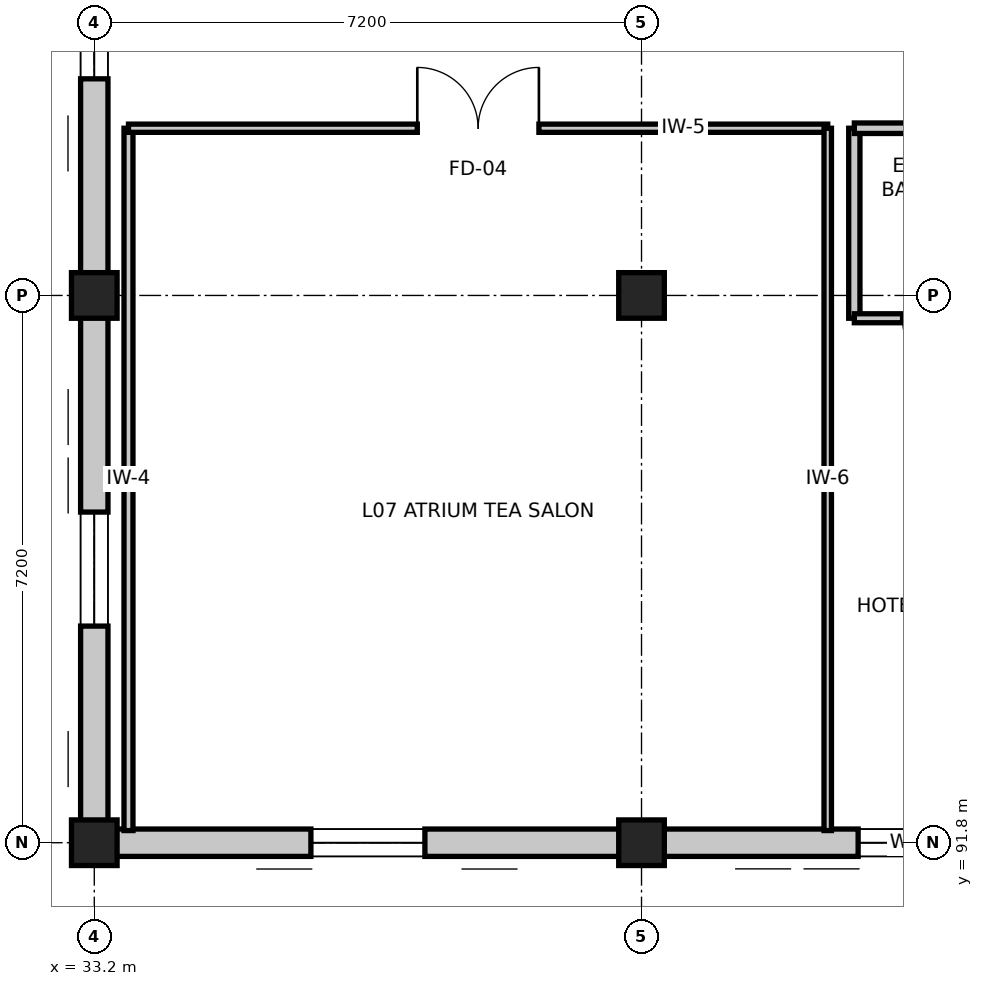
"""IFC4 building model, lengths in metres.
Left out: names, types, materials, properties, quantities, classifications, styles, units other than length and angle.
Written with IfcOpenShell. Run it as: python <this file> out.ifc"""

import sys

from ifc_helpers import new_model, si_unit, direction, frame, frame_2d, origin, origin_2d, place, context, subcontext, project, spatial, rectangle, extrude, element, fill, save


model = new_model("IFC4")
c1 = context("Model", 3, precision=1e-05, world=origin(), true_north=direction((0.0, 1.0)))
c2 = subcontext(c1, "Body", "Model", "MODEL_VIEW")
j1 = project(units=[si_unit("LENGTHUNIT", "METRE"), si_unit("PLANEANGLEUNIT", "RADIAN")], contexts=[c1])
p1 = place(None, origin())
s1 = spatial("IfcSite", under=j1, at=p1, CompositionType="ELEMENT")
p2 = place(p1, origin())
s2 = spatial("IfcBuilding", under=s1, at=p2, CompositionType="ELEMENT")
p3 = place(p2, frame((0.0, 0.0, 30.0)))
s3 = spatial("IfcBuildingStorey", under=s2, at=p3, CompositionType="ELEMENT", Elevation=30.0)
for number, where, z_axis, x_axis in (
    (1, (33.2, 91.8, 0.0), (0.0, 0.0, 1.0), (1.0, 0.0, 0.0)),
    (2, (33.2, 99.0, 0.0), (0.0, 0.0, 1.0), (1.0, 0.0, 0.0)),
    (3, (40.4, 91.8, 0.0), (0.0, 0.0, 1.0), (1.0, 0.0, 0.0)),
    (4, (40.4, 99.0, 0.0), (0.0, 0.0, 1.0), (1.0, 0.0, 0.0)),
):
    element("IfcColumn", number, at=place(p3, frame(where, z_axis=z_axis, x_axis=x_axis)), inside=s3, PredefinedType="COLUMN", context=c2, shape_type="SweptSolid", body=[
        extrude(rectangle(XDim=0.6, YDim=0.6, at=origin_2d()), origin(), (0.0, 0.0, 1.0), 3.6),
    ])
p4 = place(p3, frame((47.6, 91.8, 0.0), z_axis=(0.0, 0.0, 1.0), x_axis=(-1.0, 0.0, 0.0)))
e5 = element("IfcWall", 5, at=p4, inside=s3, PredefinedType="STANDARD", context=c2, shape_type="SweptSolid", body=[
    extrude(rectangle(XDim=7.2, YDim=0.36, at=frame_2d((3.6, 0.0))), origin(), (0.0, 0.0, 1.0), 2.745),
])
p5 = place(p4, frame((2.85, 0.0, 0.75)))
e6 = element("IfcOpeningElement", 6, at=p5, cuts=e5, PredefinedType="OPENING", context=c2, shape_type="SweptSolid", body=[
    extrude(rectangle(XDim=1.5, YDim=1.5, at=frame_2d((0.75, 0.75))), frame((0.0, 0.19, 0.0), z_axis=(0.0, -1.0, 0.0), x_axis=(1.0, 0.0, 0.0)), (0.0, 0.0, 1.0), 0.38),
])
p6 = place(p3, frame((40.4, 91.8, 0.0), z_axis=(0.0, 0.0, 1.0), x_axis=(-1.0, 0.0, 0.0)))
e7 = element("IfcWall", 7, at=p6, inside=s3, PredefinedType="STANDARD", context=c2, shape_type="SweptSolid", body=[
    extrude(rectangle(XDim=7.2, YDim=0.36, at=frame_2d((3.6, 0.0))), origin(), (0.0, 0.0, 1.0), 2.745),
])
p7 = place(p6, frame((2.85, 0.0, 0.75)))
e8 = element("IfcOpeningElement", 8, at=p7, cuts=e7, PredefinedType="OPENING", context=c2, shape_type="SweptSolid", body=[
    extrude(rectangle(XDim=1.5, YDim=1.5, at=frame_2d((0.75, 0.75))), frame((0.0, 0.19, 0.0), z_axis=(0.0, -1.0, 0.0), x_axis=(1.0, 0.0, 0.0)), (0.0, 0.0, 1.0), 0.38),
])
p8 = place(p3, frame((33.2, 91.8, 0.0), z_axis=(0.0, 0.0, 1.0), x_axis=(0.0, 1.0, 0.0)))
e9 = element("IfcWall", 9, at=p8, inside=s3, PredefinedType="STANDARD", context=c2, shape_type="SweptSolid", body=[
    extrude(rectangle(XDim=7.2, YDim=0.36, at=frame_2d((3.6, 0.0))), origin(), (0.0, 0.0, 1.0), 2.695),
])
p9 = place(p8, frame((2.85, 0.0, 0.75)))
e10 = element("IfcOpeningElement", 10, at=p9, cuts=e9, PredefinedType="OPENING", context=c2, shape_type="SweptSolid", body=[
    extrude(rectangle(XDim=1.5, YDim=1.5, at=frame_2d((0.75, 0.75))), frame((0.0, 0.19, 0.0), z_axis=(0.0, -1.0, 0.0), x_axis=(1.0, 0.0, 0.0)), (0.0, 0.0, 1.0), 0.38),
])
p10 = place(p3, frame((33.2, 99.0, 0.0), z_axis=(0.0, 0.0, 1.0), x_axis=(0.0, 1.0, 0.0)))
e11 = element("IfcWall", 11, at=p10, inside=s3, PredefinedType="STANDARD", context=c2, shape_type="SweptSolid", body=[
    extrude(rectangle(XDim=7.2, YDim=0.36, at=frame_2d((3.6, 0.0))), origin(), (0.0, 0.0, 1.0), 2.695),
])
p11 = place(p10, frame((2.85, 0.0, 0.75)))
e12 = element("IfcOpeningElement", 12, at=p11, cuts=e11, PredefinedType="OPENING", context=c2, shape_type="SweptSolid", body=[
    extrude(rectangle(XDim=1.5, YDim=1.5, at=frame_2d((0.75, 0.75))), frame((0.0, 0.19, 0.0), z_axis=(0.0, -1.0, 0.0), x_axis=(1.0, 0.0, 0.0)), (0.0, 0.0, 1.0), 0.38),
])
p12 = place(p3, frame((33.65, 91.96, 0.0), z_axis=(0.0, 0.0, 1.0), x_axis=(0.0, 1.0, 0.0)))
e13 = element("IfcWall", 13, at=p12, inside=s3, PredefinedType="PARTITIONING", context=c2, shape_type="SweptSolid", body=[
    extrude(rectangle(XDim=9.24, YDim=0.118, at=frame_2d((4.62, 0.0))), origin(), (0.0, 0.0, 1.0), 2.745),
])
p13 = place(p3, frame((33.65, 101.2, 0.0), z_axis=(0.0, 0.0, 1.0), x_axis=(1.0, 0.0, 0.0)))
e14 = element("IfcWall", 14, at=p13, inside=s3, PredefinedType="PARTITIONING", context=c2, shape_type="SweptSolid", body=[
    extrude(rectangle(XDim=9.2, YDim=0.108, at=frame_2d((4.6, 0.0))), origin(), (0.0, 0.0, 1.0), 2.695),
])
p14 = place(p13, frame((3.8, 0.0, 0.0)))
e15 = element("IfcOpeningElement", 15, at=p14, cuts=e14, PredefinedType="OPENING", context=c2, shape_type="SweptSolid", body=[
    extrude(rectangle(XDim=1.6, YDim=2.15, at=frame_2d((0.8, 1.075))), frame((0.0, 0.064, 0.0), z_axis=(0.0, -1.0, 0.0), x_axis=(1.0, 0.0, 0.0)), (0.0, 0.0, 1.0), 0.128),
])
p15 = place(p3, frame((42.85, 101.2, 0.0), z_axis=(0.0, 0.0, 1.0), x_axis=(0.0, -1.0, 0.0)))
e16 = element("IfcWall", 16, at=p15, inside=s3, PredefinedType="PARTITIONING", context=c2, shape_type="SweptSolid", body=[
    extrude(rectangle(XDim=9.24, YDim=0.098, at=frame_2d((4.62, 0.0))), origin(), (0.0, 0.0, 1.0), 2.745),
])
p16 = place(p3, frame((43.2, 98.7, 0.0), z_axis=(0.0, 0.0, 1.0), x_axis=(0.0, 1.0, 0.0)))
e17 = element("IfcWall", 17, at=p16, inside=s3, PredefinedType="PARTITIONING", context=c2, shape_type="SweptSolid", body=[
    extrude(rectangle(XDim=2.5, YDim=0.148, at=frame_2d((1.25, 0.0))), origin(), (0.0, 0.0, 1.0), 2.745),
])
p17 = place(p3, frame((43.2, 101.2, 0.0), z_axis=(0.0, 0.0, 1.0), x_axis=(1.0, 0.0, 0.0)))
e18 = element("IfcWall", 18, at=p17, inside=s3, PredefinedType="PARTITIONING", context=c2, shape_type="SweptSolid", body=[
    extrude(rectangle(XDim=2.2, YDim=0.138, at=frame_2d((1.1, 0.0))), origin(), (0.0, 0.0, 1.0), 3.36),
])
p18 = place(p3, frame((45.4, 98.7, 0.0), z_axis=(0.0, 0.0, 1.0), x_axis=(-1.0, 0.0, 0.0)))
e19 = element("IfcWall", 19, at=p18, inside=s3, PredefinedType="PARTITIONING", context=c2, shape_type="SweptSolid", body=[
    extrude(rectangle(XDim=2.2, YDim=0.118, at=frame_2d((1.1, 0.0))), origin(), (0.0, 0.0, 1.0), 3.36),
])
p19 = place(p18, frame((0.635, 0.0, 0.0)))
e20 = element("IfcOpeningElement", 20, at=p19, cuts=e19, PredefinedType="OPENING", context=c2, shape_type="SweptSolid", body=[
    extrude(rectangle(XDim=0.93, YDim=2.13, at=frame_2d((0.465, 1.065))), frame((0.0, 0.069, 0.0), z_axis=(0.0, -1.0, 0.0), x_axis=(1.0, 0.0, 0.0)), (0.0, 0.0, 1.0), 0.138),
])
p20 = place(p5, origin())
e21 = element("IfcWindow", 21, at=p20, inside=s3, PartitioningType="SINGLE_PANEL", PredefinedType="WINDOW", context=c2, shape_type="SweptSolid", body=[
    extrude(rectangle(XDim=1.5, YDim=1.5, at=frame_2d((0.75, 0.75))), frame((0.0, 0.03, 0.0), z_axis=(0.0, -1.0, 0.0), x_axis=(1.0, 0.0, 0.0)), (0.0, 0.0, 1.0), 0.06),
])
fill(e6, e21)
p21 = place(p7, origin())
e22 = element("IfcWindow", 22, at=p21, inside=s3, PartitioningType="SINGLE_PANEL", PredefinedType="WINDOW", context=c2, shape_type="SweptSolid", body=[
    extrude(rectangle(XDim=1.5, YDim=1.5, at=frame_2d((0.75, 0.75))), frame((0.0, 0.03, 0.0), z_axis=(0.0, -1.0, 0.0), x_axis=(1.0, 0.0, 0.0)), (0.0, 0.0, 1.0), 0.06),
])
fill(e8, e22)
p22 = place(p9, origin())
e23 = element("IfcWindow", 23, at=p22, inside=s3, PartitioningType="SINGLE_PANEL", PredefinedType="WINDOW", context=c2, shape_type="SweptSolid", body=[
    extrude(rectangle(XDim=1.5, YDim=1.5, at=frame_2d((0.75, 0.75))), frame((0.0, 0.03, 0.0), z_axis=(0.0, -1.0, 0.0), x_axis=(1.0, 0.0, 0.0)), (0.0, 0.0, 1.0), 0.06),
])
fill(e10, e23)
p23 = place(p11, origin())
e24 = element("IfcWindow", 24, at=p23, inside=s3, PartitioningType="SINGLE_PANEL", PredefinedType="WINDOW", context=c2, shape_type="SweptSolid", body=[
    extrude(rectangle(XDim=1.5, YDim=1.5, at=frame_2d((0.75, 0.75))), frame((0.0, 0.03, 0.0), z_axis=(0.0, -1.0, 0.0), x_axis=(1.0, 0.0, 0.0)), (0.0, 0.0, 1.0), 0.06),
])
fill(e12, e24)
p24 = place(p14, origin())
e25 = element("IfcDoor", 25, at=p24, inside=s3, OperationType="DOUBLE_DOOR_SINGLE_SWING", PredefinedType="DOOR", context=c2, shape_type="SweptSolid", body=[
    extrude(rectangle(XDim=1.6, YDim=2.15, at=frame_2d((0.8, 1.075))), frame((0.0, 0.025, 0.0), z_axis=(0.0, -1.0, 0.0), x_axis=(1.0, 0.0, 0.0)), (0.0, 0.0, 1.0), 0.05),
])
fill(e15, e25)
p25 = place(p19, origin())
e26 = element("IfcDoor", 26, at=p25, inside=s3, OperationType="SINGLE_SWING_LEFT", PredefinedType="DOOR", context=c2, shape_type="SweptSolid", body=[
    extrude(rectangle(XDim=0.93, YDim=2.13, at=frame_2d((0.465, 1.065))), frame((0.0, 0.025, 0.0), z_axis=(0.0, -1.0, 0.0), x_axis=(1.0, 0.0, 0.0)), (0.0, 0.0, 1.0), 0.05),
])
fill(e20, e26)
save(model, sys.argv[1])
